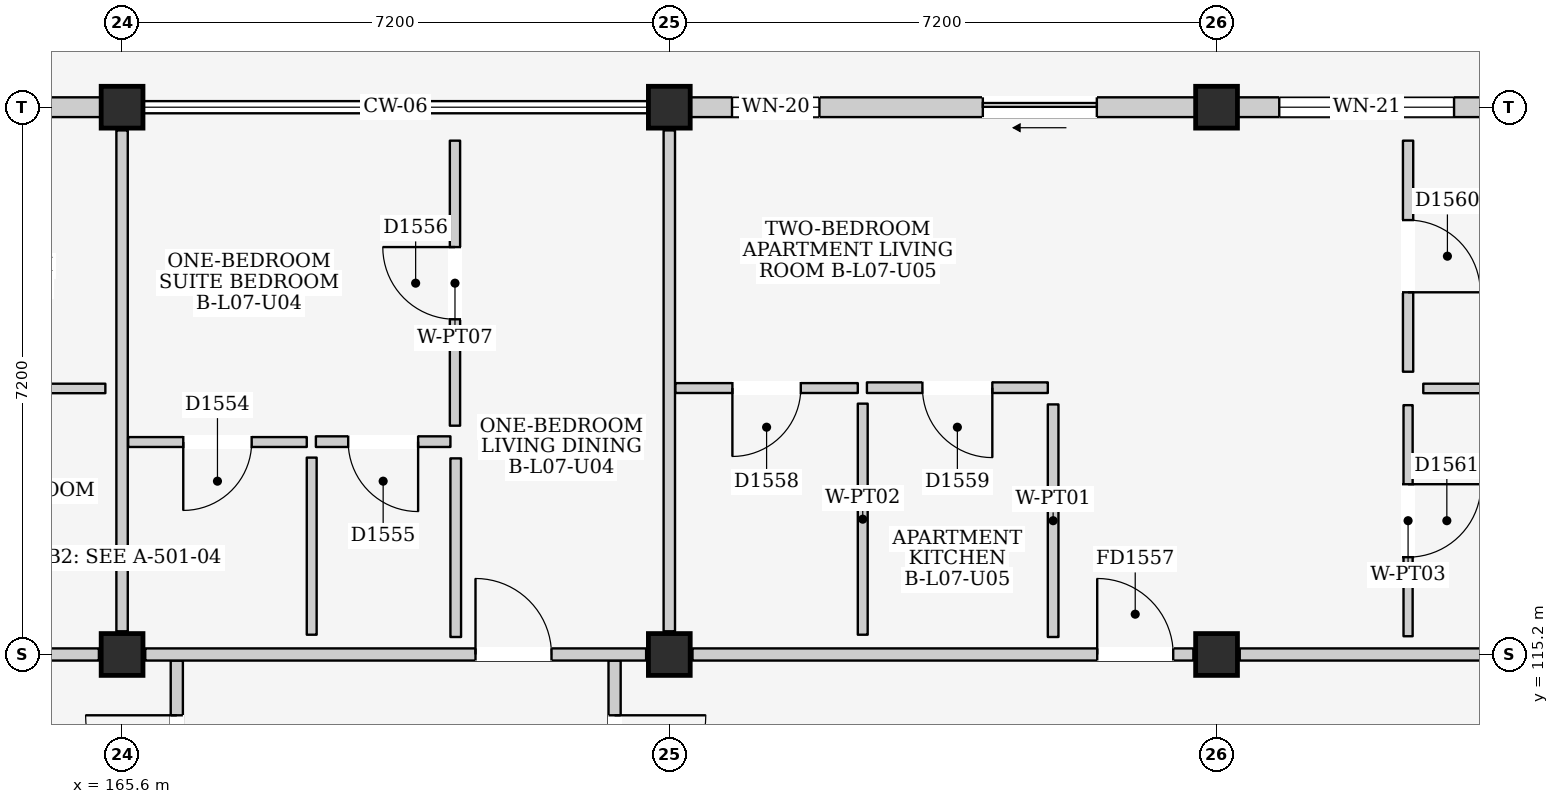
"""IFC4 building model, lengths in metres.
Left out: names, types, materials, properties, quantities, classifications, styles, units other than length and angle.
Written with IfcOpenShell. Run it as: python <this file> out.ifc"""

import sys

from ifc_helpers import new_model, si_unit, direction, frame, frame_2d, origin, origin_2d, place, context, subcontext, project, spatial, rectangle, extrude, element, fill, save


model = new_model("IFC4")
c1 = context("Model", 3, precision=1e-05, world=origin(), true_north=direction((0.0, 1.0)))
c2 = subcontext(c1, "Body", "Model", "MODEL_VIEW")
j1 = project(units=[si_unit("LENGTHUNIT", "METRE"), si_unit("PLANEANGLEUNIT", "RADIAN")], contexts=[c1])
p1 = place(None, origin())
s1 = spatial("IfcSite", under=j1, at=p1, CompositionType="ELEMENT")
p2 = place(p1, origin())
s2 = spatial("IfcBuilding", under=s1, at=p2, CompositionType="ELEMENT")
p3 = place(p2, frame((0.0, 0.0, 25.1)))
s3 = spatial("IfcBuildingStorey", under=s2, at=p3, CompositionType="ELEMENT", Elevation=25.1)
for number, where, z_axis, x_axis in (
    (1, (165.6, 115.2, 0.0), (0.0, 0.0, 1.0), (1.0, 0.0, 0.0)),
    (2, (165.6, 122.4, 0.0), (0.0, 0.0, 1.0), (1.0, 0.0, 0.0)),
    (3, (172.8, 115.2, 0.0), (0.0, 0.0, 1.0), (1.0, 0.0, 0.0)),
    (4, (172.8, 122.4, 0.0), (0.0, 0.0, 1.0), (1.0, 0.0, 0.0)),
    (5, (180.0, 115.2, 0.0), (0.0, 0.0, 1.0), (1.0, 0.0, 0.0)),
    (6, (180.0, 122.4, 0.0), (0.0, 0.0, 1.0), (1.0, 0.0, 0.0)),
):
    element("IfcColumn", number, at=place(p3, frame(where, z_axis=z_axis, x_axis=x_axis)), inside=s3, PredefinedType="COLUMN", context=c2, shape_type="SweptSolid", body=[
        extrude(rectangle(XDim=0.55, YDim=0.55, at=origin_2d()), origin(), (0.0, 0.0, 1.0), 3.2),
    ])
p4 = place(p3, frame((158.675, 122.4, 0.0), z_axis=(0.0, 0.0, 1.0), x_axis=(1.0, 0.0, 0.0)))
e7 = element("IfcWall", 7, at=p4, inside=s3, PredefinedType="ELEMENTEDWALL", context=c2, shape_type="SweptSolid", body=[
    extrude(rectangle(XDim=6.65, YDim=0.26, at=frame_2d((3.325, 0.0))), origin(), (0.0, 0.0, 1.0), 2.525),
])
p5 = place(p4, frame((3.85, 0.0, 0.0)))
e8 = element("IfcOpeningElement", 8, at=p5, cuts=e7, PredefinedType="OPENING", context=c2, shape_type="SweptSolid", body=[
    extrude(rectangle(XDim=1.8, YDim=2.12, at=frame_2d((0.9, 1.06))), frame((0.0, 0.145, 0.0), z_axis=(0.0, -1.0, 0.0), x_axis=(1.0, 0.0, 0.0)), (0.0, 0.0, 1.0), 0.29),
])
p6 = place(p4, frame((0.55, 0.0, 0.865)))
e9 = element("IfcOpeningElement", 9, at=p6, cuts=e7, PredefinedType="OPENING", context=c2, shape_type="SweptSolid", body=[
    extrude(rectangle(XDim=1.95, YDim=1.55, at=frame_2d((0.975, 0.775))), frame((0.0, 0.145, 0.0), z_axis=(0.0, -1.0, 0.0), x_axis=(1.0, 0.0, 0.0)), (0.0, 0.0, 1.0), 0.29),
])
p7 = place(p3, frame((173.075, 122.4, 0.0), z_axis=(0.0, 0.0, 1.0), x_axis=(1.0, 0.0, 0.0)))
e10 = element("IfcWall", 10, at=p7, inside=s3, PredefinedType="ELEMENTEDWALL", context=c2, shape_type="SweptSolid", body=[
    extrude(rectangle(XDim=6.65, YDim=0.26, at=frame_2d((3.325, 0.0))), origin(), (0.0, 0.0, 1.0), 2.525),
])
p8 = place(p7, frame((3.85, 0.0, 0.0)))
e11 = element("IfcOpeningElement", 11, at=p8, cuts=e10, PredefinedType="OPENING", context=c2, shape_type="SweptSolid", body=[
    extrude(rectangle(XDim=1.5, YDim=2.12, at=frame_2d((0.75, 1.06))), frame((0.0, 0.145, 0.0), z_axis=(0.0, -1.0, 0.0), x_axis=(1.0, 0.0, 0.0)), (0.0, 0.0, 1.0), 0.29),
])
p9 = place(p7, frame((0.55, 0.0, 0.9)))
e12 = element("IfcOpeningElement", 12, at=p9, cuts=e10, PredefinedType="OPENING", context=c2, shape_type="SweptSolid", body=[
    extrude(rectangle(XDim=1.15, YDim=1.15, at=frame_2d((0.575, 0.575))), frame((0.0, 0.145, 0.0), z_axis=(0.0, -1.0, 0.0), x_axis=(1.0, 0.0, 0.0)), (0.0, 0.0, 1.0), 0.29),
])
p10 = place(p3, frame((180.275, 122.4, 0.0), z_axis=(0.0, 0.0, 1.0), x_axis=(1.0, 0.0, 0.0)))
e13 = element("IfcWall", 13, at=p10, inside=s3, PredefinedType="ELEMENTEDWALL", context=c2, shape_type="SweptSolid", body=[
    extrude(rectangle(XDim=6.65, YDim=0.26, at=frame_2d((3.325, 0.0))), origin(), (0.0, 0.0, 1.0), 2.525),
])
p11 = place(p10, frame((3.85, 0.0, 0.0)))
e14 = element("IfcOpeningElement", 14, at=p11, cuts=e13, PredefinedType="OPENING", context=c2, shape_type="SweptSolid", body=[
    extrude(rectangle(XDim=2.4, YDim=2.12, at=frame_2d((1.2, 1.06))), frame((0.0, 0.145, 0.0), z_axis=(0.0, -1.0, 0.0), x_axis=(1.0, 0.0, 0.0)), (0.0, 0.0, 1.0), 0.29),
])
p12 = place(p10, frame((0.55, 0.0, 0.815)))
e15 = element("IfcOpeningElement", 15, at=p12, cuts=e13, PredefinedType="OPENING", context=c2, shape_type="SweptSolid", body=[
    extrude(rectangle(XDim=2.3, YDim=1.6, at=frame_2d((1.15, 0.8))), frame((0.0, 0.145, 0.0), z_axis=(0.0, -1.0, 0.0), x_axis=(1.0, 0.0, 0.0)), (0.0, 0.0, 1.0), 0.29),
])
p13 = place(p3, frame((166.32, 110.8, 0.0), z_axis=(0.0, 0.0, 1.0), x_axis=(0.0, 1.0, 0.0)))
e16 = element("IfcWall", 16, at=p13, inside=s3, PredefinedType="PARTITIONING", context=c2, shape_type="SweptSolid", body=[
    extrude(rectangle(XDim=4.32, YDim=0.16, at=frame_2d((2.16, 0.0))), origin(), (0.0, 0.0, 1.0), 2.99),
])
p14 = place(p13, frame((2.4, 0.0, 0.0)))
e17 = element("IfcOpeningElement", 17, at=p14, cuts=e16, PredefinedType="OPENING", context=c2, shape_type="SweptSolid", body=[
    extrude(rectangle(XDim=1.2, YDim=2.2, at=frame_2d((0.6, 1.1))), frame((0.0, 0.095, 0.0), z_axis=(0.0, -1.0, 0.0), x_axis=(1.0, 0.0, 0.0)), (0.0, 0.0, 1.0), 0.19),
])
p15 = place(p3, frame((172.08, 110.8, 0.0), z_axis=(0.0, 0.0, 1.0), x_axis=(0.0, 1.0, 0.0)))
e18 = element("IfcWall", 18, at=p15, inside=s3, PredefinedType="PARTITIONING", context=c2, shape_type="SweptSolid", body=[
    extrude(rectangle(XDim=4.32, YDim=0.16, at=frame_2d((2.16, 0.0))), origin(), (0.0, 0.0, 1.0), 2.99),
])
p16 = place(p15, frame((2.4, 0.0, 0.0)))
e19 = element("IfcOpeningElement", 19, at=p16, cuts=e18, PredefinedType="OPENING", context=c2, shape_type="SweptSolid", body=[
    extrude(rectangle(XDim=1.2, YDim=2.2, at=frame_2d((0.6, 1.1))), frame((0.0, 0.095, 0.0), z_axis=(0.0, -1.0, 0.0), x_axis=(1.0, 0.0, 0.0)), (0.0, 0.0, 1.0), 0.19),
])
p17 = place(p3, frame((158.705, 115.2, 0.0), z_axis=(0.0, 0.0, 1.0), x_axis=(1.0, 0.0, 0.0)))
e20 = element("IfcWall", 20, at=p17, inside=s3, PredefinedType="PARTITIONING", context=c2, shape_type="SweptSolid", body=[
    extrude(rectangle(XDim=6.59, YDim=0.16, at=frame_2d((3.295, 0.0))), origin(), (0.0, 0.0, 1.0), 2.375),
])
p18 = place(p3, frame((165.6, 115.505, 0.0), z_axis=(0.0, 0.0, 1.0), x_axis=(0.0, 1.0, 0.0)))
e21 = element("IfcWall", 21, at=p18, inside=s3, PredefinedType="PARTITIONING", context=c2, shape_type="SweptSolid", body=[
    extrude(rectangle(XDim=6.59, YDim=0.15, at=frame_2d((3.295, 0.0))), origin(), (0.0, 0.0, 1.0), 2.475),
])
p19 = place(p3, frame((161.32, 118.7, 0.0), z_axis=(0.0, 0.0, 1.0), x_axis=(1.0, 0.0, 0.0)))
e22 = element("IfcWall", 22, at=p19, inside=s3, PredefinedType="PARTITIONING", context=c2, shape_type="SweptSolid", body=[
    extrude(rectangle(XDim=4.06, YDim=0.125, at=frame_2d((2.03, 0.0))), origin(), (0.0, 0.0, 1.0), 2.99),
])
p20 = place(p3, frame((165.905, 115.2, 0.0), z_axis=(0.0, 0.0, 1.0), x_axis=(1.0, 0.0, 0.0)))
e23 = element("IfcWall", 23, at=p20, inside=s3, PredefinedType="PARTITIONING", context=c2, shape_type="SweptSolid", body=[
    extrude(rectangle(XDim=6.59, YDim=0.16, at=frame_2d((3.295, 0.0))), origin(), (0.0, 0.0, 1.0), 2.375),
])
p21 = place(p20, frame((4.345, 0.0, 0.0)))
e24 = element("IfcOpeningElement", 24, at=p21, cuts=e23, PredefinedType="OPENING", context=c2, shape_type="SweptSolid", body=[
    extrude(rectangle(XDim=1.0, YDim=2.15, at=frame_2d((0.5, 1.075))), frame((0.0, 0.095, 0.0), z_axis=(0.0, -1.0, 0.0), x_axis=(1.0, 0.0, 0.0)), (0.0, 0.0, 1.0), 0.19),
])
p22 = place(p3, frame((172.8, 115.505, 0.0), z_axis=(0.0, 0.0, 1.0), x_axis=(0.0, 1.0, 0.0)))
e25 = element("IfcWall", 25, at=p22, inside=s3, PredefinedType="PARTITIONING", context=c2, shape_type="SweptSolid", body=[
    extrude(rectangle(XDim=6.59, YDim=0.15, at=frame_2d((3.295, 0.0))), origin(), (0.0, 0.0, 1.0), 2.475),
])
p23 = place(p3, frame((165.68, 117.995, 0.0), z_axis=(0.0, 0.0, 1.0), x_axis=(1.0, 0.0, 0.0)))
e26 = element("IfcWall", 26, at=p23, inside=s3, PredefinedType="PARTITIONING", context=c2, shape_type="SweptSolid", body=[
    extrude(rectangle(XDim=2.35, YDim=0.13, at=frame_2d((1.175, 0.0))), origin(), (0.0, 0.0, 1.0), 2.99),
])
p24 = place(p23, frame((0.725, 0.0, 0.0)))
e27 = element("IfcOpeningElement", 27, at=p24, cuts=e26, PredefinedType="OPENING", context=c2, shape_type="SweptSolid", body=[
    extrude(rectangle(XDim=0.9, YDim=2.1, at=frame_2d((0.45, 1.05))), frame((0.0, 0.08, 0.0), z_axis=(0.0, -1.0, 0.0), x_axis=(1.0, 0.0, 0.0)), (0.0, 0.0, 1.0), 0.16),
])
p25 = place(p3, frame((168.095, 115.46, 0.0), z_axis=(0.0, 0.0, 1.0), x_axis=(0.0, 1.0, 0.0)))
e28 = element("IfcWall", 28, at=p25, inside=s3, PredefinedType="PARTITIONING", context=c2, shape_type="SweptSolid", body=[
    extrude(rectangle(XDim=2.33, YDim=0.13, at=frame_2d((1.165, 0.0))), origin(), (0.0, 0.0, 1.0), 2.99),
])
p26 = place(p3, frame((168.15, 118.0, 0.0), z_axis=(0.0, 0.0, 1.0), x_axis=(1.0, 0.0, 0.0)))
e29 = element("IfcWall", 29, at=p26, inside=s3, PredefinedType="PARTITIONING", context=c2, shape_type="SweptSolid", body=[
    extrude(rectangle(XDim=1.77, YDim=0.14, at=frame_2d((0.885, 0.0))), origin(), (0.0, 0.0, 1.0), 2.99),
])
p27 = place(p26, frame((0.425, 0.0, 0.0)))
e30 = element("IfcOpeningElement", 30, at=p27, cuts=e29, PredefinedType="OPENING", context=c2, shape_type="SweptSolid", body=[
    extrude(rectangle(XDim=0.92, YDim=2.1, at=frame_2d((0.46, 1.05))), frame((0.0, 0.085, 0.0), z_axis=(0.0, -1.0, 0.0), x_axis=(1.0, 0.0, 0.0)), (0.0, 0.0, 1.0), 0.17),
])
p28 = place(p3, frame((169.99, 115.43, 0.0), z_axis=(0.0, 0.0, 1.0), x_axis=(0.0, 1.0, 0.0)))
e31 = element("IfcWall", 31, at=p28, inside=s3, PredefinedType="PARTITIONING", context=c2, shape_type="SweptSolid", body=[
    extrude(rectangle(XDim=2.35, YDim=0.14, at=frame_2d((1.175, 0.0))), origin(), (0.0, 0.0, 1.0), 2.99),
])
p29 = place(p3, frame((169.98, 118.21, 0.0), z_axis=(0.0, 0.0, 1.0), x_axis=(0.0, 1.0, 0.0)))
e32 = element("IfcWall", 32, at=p29, inside=s3, PredefinedType="PARTITIONING", context=c2, shape_type="SweptSolid", body=[
    extrude(rectangle(XDim=3.75, YDim=0.135, at=frame_2d((1.875, 0.0))), origin(), (0.0, 0.0, 1.0), 2.99),
])
p30 = place(p29, frame((1.4, 0.0, 0.0)))
e33 = element("IfcOpeningElement", 33, at=p30, cuts=e32, PredefinedType="OPENING", context=c2, shape_type="SweptSolid", body=[
    extrude(rectangle(XDim=0.95, YDim=2.15, at=frame_2d((0.475, 1.075))), frame((0.0, 0.083, 0.0), z_axis=(0.0, -1.0, 0.0), x_axis=(1.0, 0.0, 0.0)), (0.0, 0.0, 1.0), 0.165),
])
p31 = place(p3, frame((173.105, 115.2, 0.0), z_axis=(0.0, 0.0, 1.0), x_axis=(1.0, 0.0, 0.0)))
e34 = element("IfcWall", 34, at=p31, inside=s3, PredefinedType="PARTITIONING", context=c2, shape_type="SweptSolid", body=[
    extrude(rectangle(XDim=6.59, YDim=0.16, at=frame_2d((3.295, 0.0))), origin(), (0.0, 0.0, 1.0), 2.375),
])
p32 = place(p31, frame((5.325, 0.0, 0.0)))
e35 = element("IfcOpeningElement", 35, at=p32, cuts=e34, PredefinedType="OPENING", context=c2, shape_type="SweptSolid", body=[
    extrude(rectangle(XDim=1.0, YDim=2.15, at=frame_2d((0.5, 1.075))), frame((0.0, 0.095, 0.0), z_axis=(0.0, -1.0, 0.0), x_axis=(1.0, 0.0, 0.0)), (0.0, 0.0, 1.0), 0.19),
])
p33 = place(p3, frame((180.305, 115.2, 0.0), z_axis=(0.0, 0.0, 1.0), x_axis=(1.0, 0.0, 0.0)))
e36 = element("IfcWall", 36, at=p33, inside=s3, PredefinedType="PARTITIONING", context=c2, shape_type="SweptSolid", body=[
    extrude(rectangle(XDim=6.59, YDim=0.16, at=frame_2d((3.295, 0.0))), origin(), (0.0, 0.0, 1.0), 2.375),
])
p34 = place(p3, frame((172.88, 118.705, 0.0), z_axis=(0.0, 0.0, 1.0), x_axis=(1.0, 0.0, 0.0)))
e37 = element("IfcWall", 37, at=p34, inside=s3, PredefinedType="PARTITIONING", context=c2, shape_type="SweptSolid", body=[
    extrude(rectangle(XDim=2.4, YDim=0.13, at=frame_2d((1.2, 0.0))), origin(), (0.0, 0.0, 1.0), 2.99),
])
p35 = place(p34, frame((0.75, 0.0, 0.0)))
e38 = element("IfcOpeningElement", 38, at=p35, cuts=e37, PredefinedType="OPENING", context=c2, shape_type="SweptSolid", body=[
    extrude(rectangle(XDim=0.9, YDim=2.1, at=frame_2d((0.45, 1.05))), frame((0.0, 0.08, 0.0), z_axis=(0.0, -1.0, 0.0), x_axis=(1.0, 0.0, 0.0)), (0.0, 0.0, 1.0), 0.16),
])
p36 = place(p3, frame((175.345, 115.46, 0.0), z_axis=(0.0, 0.0, 1.0), x_axis=(0.0, 1.0, 0.0)))
e39 = element("IfcWall", 39, at=p36, inside=s3, PredefinedType="PARTITIONING", context=c2, shape_type="SweptSolid", body=[
    extrude(rectangle(XDim=3.04, YDim=0.13, at=frame_2d((1.52, 0.0))), origin(), (0.0, 0.0, 1.0), 2.99),
])
p37 = place(p3, frame((175.4, 118.71, 0.0), z_axis=(0.0, 0.0, 1.0), x_axis=(1.0, 0.0, 0.0)))
e40 = element("IfcWall", 40, at=p37, inside=s3, PredefinedType="PARTITIONING", context=c2, shape_type="SweptSolid", body=[
    extrude(rectangle(XDim=2.38, YDim=0.14, at=frame_2d((1.19, 0.0))), origin(), (0.0, 0.0, 1.0), 2.99),
])
p38 = place(p37, frame((0.73, 0.0, 0.0)))
e41 = element("IfcOpeningElement", 41, at=p38, cuts=e40, PredefinedType="OPENING", context=c2, shape_type="SweptSolid", body=[
    extrude(rectangle(XDim=0.92, YDim=2.1, at=frame_2d((0.46, 1.05))), frame((0.0, 0.085, 0.0), z_axis=(0.0, -1.0, 0.0), x_axis=(1.0, 0.0, 0.0)), (0.0, 0.0, 1.0), 0.17),
])
p39 = place(p3, frame((177.85, 115.43, 0.0), z_axis=(0.0, 0.0, 1.0), x_axis=(0.0, 1.0, 0.0)))
e42 = element("IfcWall", 42, at=p39, inside=s3, PredefinedType="PARTITIONING", context=c2, shape_type="SweptSolid", body=[
    extrude(rectangle(XDim=3.06, YDim=0.14, at=frame_2d((1.53, 0.0))), origin(), (0.0, 0.0, 1.0), 2.99),
])
p40 = place(p3, frame((182.52, 118.92, 0.0), z_axis=(0.0, 0.0, 1.0), x_axis=(0.0, 1.0, 0.0)))
e43 = element("IfcWall", 43, at=p40, inside=s3, PredefinedType="PARTITIONING", context=c2, shape_type="SweptSolid", body=[
    extrude(rectangle(XDim=3.04, YDim=0.135, at=frame_2d((1.52, 0.0))), origin(), (0.0, 0.0, 1.0), 2.99),
])
p41 = place(p40, frame((1.045, 0.0, 0.0)))
e44 = element("IfcOpeningElement", 44, at=p41, cuts=e43, PredefinedType="OPENING", context=c2, shape_type="SweptSolid", body=[
    extrude(rectangle(XDim=0.95, YDim=2.15, at=frame_2d((0.475, 1.075))), frame((0.0, 0.083, 0.0), z_axis=(0.0, -1.0, 0.0), x_axis=(1.0, 0.0, 0.0)), (0.0, 0.0, 1.0), 0.165),
])
p42 = place(p3, frame((182.72, 118.7, 0.0), z_axis=(0.0, 0.0, 1.0), x_axis=(1.0, 0.0, 0.0)))
e45 = element("IfcWall", 45, at=p42, inside=s3, PredefinedType="PARTITIONING", context=c2, shape_type="SweptSolid", body=[
    extrude(rectangle(XDim=4.06, YDim=0.125, at=frame_2d((2.03, 0.0))), origin(), (0.0, 0.0, 1.0), 2.99),
])
p43 = place(p3, frame((182.52, 115.44, 0.0), z_axis=(0.0, 0.0, 1.0), x_axis=(0.0, 1.0, 0.0)))
e46 = element("IfcWall", 46, at=p43, inside=s3, PredefinedType="PARTITIONING", context=c2, shape_type="SweptSolid", body=[
    extrude(rectangle(XDim=3.04, YDim=0.12, at=frame_2d((1.52, 0.0))), origin(), (0.0, 0.0, 1.0), 2.99),
])
p44 = place(p43, frame((1.04, 0.0, 0.0)))
e47 = element("IfcOpeningElement", 47, at=p44, cuts=e46, PredefinedType="OPENING", context=c2, shape_type="SweptSolid", body=[
    extrude(rectangle(XDim=0.96, YDim=2.15, at=frame_2d((0.48, 1.075))), frame((0.0, 0.075, 0.0), z_axis=(0.0, -1.0, 0.0), x_axis=(1.0, 0.0, 0.0)), (0.0, 0.0, 1.0), 0.15),
])
p45 = place(p8, frame((1.5, 0.0, 0.0), z_axis=(0.0, 0.0, 1.0), x_axis=(-1.0, 0.0, 0.0)))
e48 = element("IfcDoor", 48, at=p45, inside=s3, OperationType="SLIDING_TO_LEFT", PredefinedType="DOOR", context=c2, shape_type="SweptSolid", body=[
    extrude(rectangle(XDim=1.5, YDim=2.12, at=frame_2d((0.75, 1.06))), frame((0.0, 0.025, 0.0), z_axis=(0.0, -1.0, 0.0), x_axis=(1.0, 0.0, 0.0)), (0.0, 0.0, 1.0), 0.05),
])
fill(e11, e48)
p46 = place(p9, origin())
e49 = element("IfcWindow", 49, at=p46, inside=s3, PartitioningType="SINGLE_PANEL", PredefinedType="WINDOW", context=c2, shape_type="SweptSolid", body=[
    extrude(rectangle(XDim=1.15, YDim=1.15, at=frame_2d((0.575, 0.575))), frame((0.0, 0.03, 0.0), z_axis=(0.0, -1.0, 0.0), x_axis=(1.0, 0.0, 0.0)), (0.0, 0.0, 1.0), 0.06),
])
fill(e12, e49)
p47 = place(p12, origin())
e50 = element("IfcWindow", 50, at=p47, inside=s3, PartitioningType="TRIPLE_PANEL_VERTICAL", PredefinedType="WINDOW", context=c2, shape_type="SweptSolid", body=[
    extrude(rectangle(XDim=2.3, YDim=1.6, at=frame_2d((1.15, 0.8))), frame((0.0, 0.03, 0.0), z_axis=(0.0, -1.0, 0.0), x_axis=(1.0, 0.0, 0.0)), (0.0, 0.0, 1.0), 0.06),
])
fill(e15, e50)
p48 = place(p14, origin())
e51 = element("IfcDoor", 51, at=p48, inside=s3, OperationType="SINGLE_SWING_RIGHT", PredefinedType="DOOR", context=c2, shape_type="SweptSolid", body=[
    extrude(rectangle(XDim=1.2, YDim=2.2, at=frame_2d((0.6, 1.1))), frame((0.0, 0.025, 0.0), z_axis=(0.0, -1.0, 0.0), x_axis=(1.0, 0.0, 0.0)), (0.0, 0.0, 1.0), 0.05),
])
fill(e17, e51)
p49 = place(p16, frame((1.2, 0.0, 0.0), z_axis=(0.0, 0.0, 1.0), x_axis=(-1.0, 0.0, 0.0)))
e52 = element("IfcDoor", 52, at=p49, inside=s3, OperationType="SINGLE_SWING_LEFT", PredefinedType="DOOR", context=c2, shape_type="SweptSolid", body=[
    extrude(rectangle(XDim=1.2, YDim=2.2, at=frame_2d((0.6, 1.1))), frame((0.0, 0.025, 0.0), z_axis=(0.0, -1.0, 0.0), x_axis=(1.0, 0.0, 0.0)), (0.0, 0.0, 1.0), 0.05),
])
fill(e19, e52)
p50 = place(p21, origin())
e53 = element("IfcDoor", 53, at=p50, inside=s3, OperationType="SINGLE_SWING_LEFT", PredefinedType="DOOR", context=c2, shape_type="SweptSolid", body=[
    extrude(rectangle(XDim=1.0, YDim=2.15, at=frame_2d((0.5, 1.075))), frame((0.0, 0.025, 0.0), z_axis=(0.0, -1.0, 0.0), x_axis=(1.0, 0.0, 0.0)), (0.0, 0.0, 1.0), 0.05),
])
fill(e24, e53)
p51 = place(p24, frame((0.9, 0.0, 0.0), z_axis=(0.0, 0.0, 1.0), x_axis=(-1.0, 0.0, 0.0)))
e54 = element("IfcDoor", 54, at=p51, inside=s3, OperationType="SINGLE_SWING_RIGHT", PredefinedType="DOOR", context=c2, shape_type="SweptSolid", body=[
    extrude(rectangle(XDim=0.9, YDim=2.1, at=frame_2d((0.45, 1.05))), frame((0.0, 0.025, 0.0), z_axis=(0.0, -1.0, 0.0), x_axis=(1.0, 0.0, 0.0)), (0.0, 0.0, 1.0), 0.05),
])
fill(e27, e54)
p52 = place(p27, frame((0.92, 0.0, 0.0), z_axis=(0.0, 0.0, 1.0), x_axis=(-1.0, 0.0, 0.0)))
e55 = element("IfcDoor", 55, at=p52, inside=s3, OperationType="SINGLE_SWING_LEFT", PredefinedType="DOOR", context=c2, shape_type="SweptSolid", body=[
    extrude(rectangle(XDim=0.92, YDim=2.1, at=frame_2d((0.46, 1.05))), frame((0.0, 0.025, 0.0), z_axis=(0.0, -1.0, 0.0), x_axis=(1.0, 0.0, 0.0)), (0.0, 0.0, 1.0), 0.05),
])
fill(e30, e55)
p53 = place(p30, origin())
e56 = element("IfcDoor", 56, at=p53, inside=s3, OperationType="SINGLE_SWING_RIGHT", PredefinedType="DOOR", context=c2, shape_type="SweptSolid", body=[
    extrude(rectangle(XDim=0.95, YDim=2.15, at=frame_2d((0.475, 1.075))), frame((0.0, 0.025, 0.0), z_axis=(0.0, -1.0, 0.0), x_axis=(1.0, 0.0, 0.0)), (0.0, 0.0, 1.0), 0.05),
])
fill(e33, e56)
p54 = place(p32, origin())
e57 = element("IfcDoor", 57, at=p54, inside=s3, OperationType="SINGLE_SWING_LEFT", PredefinedType="DOOR", context=c2, shape_type="SweptSolid", body=[
    extrude(rectangle(XDim=1.0, YDim=2.15, at=frame_2d((0.5, 1.075))), frame((0.0, 0.025, 0.0), z_axis=(0.0, -1.0, 0.0), x_axis=(1.0, 0.0, 0.0)), (0.0, 0.0, 1.0), 0.05),
])
fill(e35, e57)
p55 = place(p35, frame((0.9, 0.0, 0.0), z_axis=(0.0, 0.0, 1.0), x_axis=(-1.0, 0.0, 0.0)))
e58 = element("IfcDoor", 58, at=p55, inside=s3, OperationType="SINGLE_SWING_RIGHT", PredefinedType="DOOR", context=c2, shape_type="SweptSolid", body=[
    extrude(rectangle(XDim=0.9, YDim=2.1, at=frame_2d((0.45, 1.05))), frame((0.0, 0.025, 0.0), z_axis=(0.0, -1.0, 0.0), x_axis=(1.0, 0.0, 0.0)), (0.0, 0.0, 1.0), 0.05),
])
fill(e38, e58)
p56 = place(p38, frame((0.92, 0.0, 0.0), z_axis=(0.0, 0.0, 1.0), x_axis=(-1.0, 0.0, 0.0)))
e59 = element("IfcDoor", 59, at=p56, inside=s3, OperationType="SINGLE_SWING_LEFT", PredefinedType="DOOR", context=c2, shape_type="SweptSolid", body=[
    extrude(rectangle(XDim=0.92, YDim=2.1, at=frame_2d((0.46, 1.05))), frame((0.0, 0.025, 0.0), z_axis=(0.0, -1.0, 0.0), x_axis=(1.0, 0.0, 0.0)), (0.0, 0.0, 1.0), 0.05),
])
fill(e41, e59)
p57 = place(p41, frame((0.95, 0.0, 0.0), z_axis=(0.0, 0.0, 1.0), x_axis=(-1.0, 0.0, 0.0)))
e60 = element("IfcDoor", 60, at=p57, inside=s3, OperationType="SINGLE_SWING_RIGHT", PredefinedType="DOOR", context=c2, shape_type="SweptSolid", body=[
    extrude(rectangle(XDim=0.95, YDim=2.15, at=frame_2d((0.475, 1.075))), frame((0.0, 0.025, 0.0), z_axis=(0.0, -1.0, 0.0), x_axis=(1.0, 0.0, 0.0)), (0.0, 0.0, 1.0), 0.05),
])
fill(e44, e60)
p58 = place(p44, frame((0.96, 0.0, 0.0), z_axis=(0.0, 0.0, 1.0), x_axis=(-1.0, 0.0, 0.0)))
e61 = element("IfcDoor", 61, at=p58, inside=s3, OperationType="SINGLE_SWING_LEFT", PredefinedType="DOOR", context=c2, shape_type="SweptSolid", body=[
    extrude(rectangle(XDim=0.96, YDim=2.15, at=frame_2d((0.48, 1.075))), frame((0.0, 0.025, 0.0), z_axis=(0.0, -1.0, 0.0), x_axis=(1.0, 0.0, 0.0)), (0.0, 0.0, 1.0), 0.05),
])
fill(e47, e61)
save(model, sys.argv[1])
